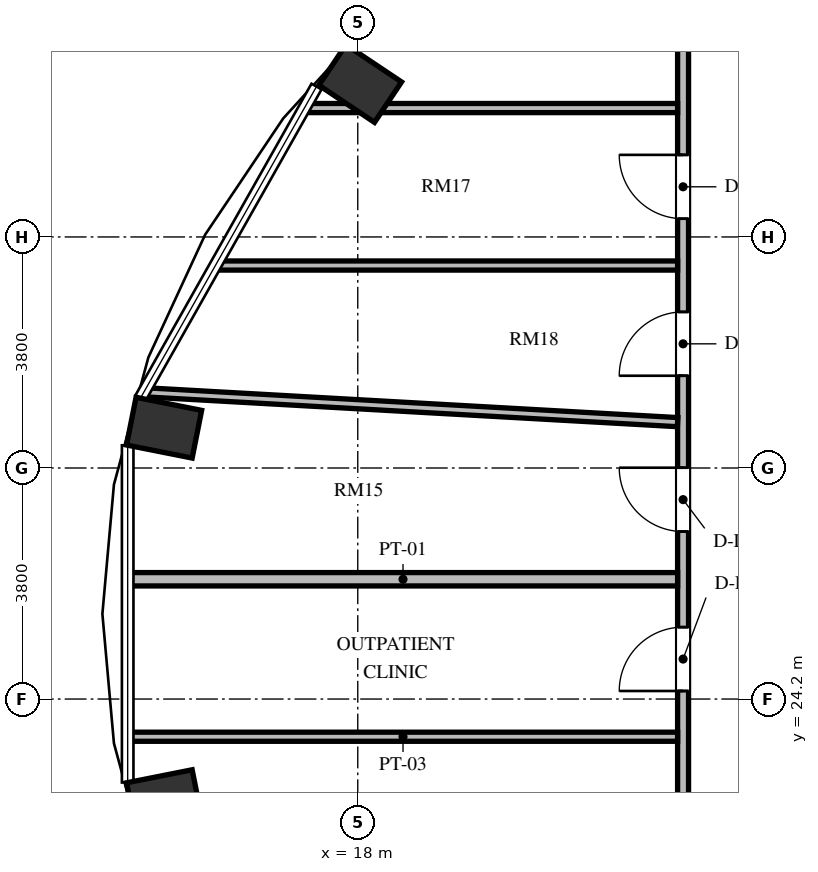
"""IFC4 building model, lengths in metres.
Left out: names, types, materials, properties, quantities, classifications, styles, units other than length and angle.
Written with IfcOpenShell. Run it as: python <this file> out.ifc"""

import sys

from ifc_helpers import new_model, si_unit, direction, frame, frame_2d, origin, origin_2d, place, context, subcontext, project, spatial, rectangle, extrude, element, fill, save


model = new_model("IFC4")
c1 = context("Model", 3, precision=1e-05, world=origin(), true_north=direction((0.0, 1.0)))
c2 = subcontext(c1, "Body", "Model", "MODEL_VIEW")
j1 = project(units=[si_unit("LENGTHUNIT", "METRE"), si_unit("PLANEANGLEUNIT", "RADIAN")], contexts=[c1])
p1 = place(None, origin())
s1 = spatial("IfcSite", under=j1, at=p1, CompositionType="ELEMENT")
p2 = place(p1, origin())
s2 = spatial("IfcBuilding", under=s1, at=p2, CompositionType="ELEMENT")
p3 = place(p2, frame((0.0, 0.0, 209.424)))
s3 = spatial("IfcBuildingStorey", under=s2, at=p3, CompositionType="ELEMENT", Elevation=209.424)
for number, where, z_axis, x_axis in (
    (1, (18.04, 34.323, 0.0), (0.0, 0.0, 1.0), (-0.831, 0.556, 0.0)),
    (2, (14.815, 28.663, 0.0), (0.0, 0.0, 1.0), (-0.981, 0.195, 0.0)),
    (3, (14.815, 22.537, 0.0), (0.0, 0.0, 1.0), (-0.981, -0.195, 0.0)),
):
    element("IfcColumn", number, at=place(p3, frame(where, z_axis=z_axis, x_axis=x_axis)), inside=s3, PredefinedType="COLUMN", context=c2, shape_type="SweptSolid", body=[
        extrude(rectangle(XDim=1.1, YDim=0.8, at=origin_2d()), origin(), (0.0, 0.0, 1.0), 3.648),
    ])
p4 = place(p3, frame((23.35, 19.98, 0.0), z_axis=(0.0, 0.0, 1.0), x_axis=(0.0, 1.0, 0.0)))
e4 = element("IfcWall", 4, at=p4, inside=s3, PredefinedType="PARTITIONING", context=c2, shape_type="SweptSolid", body=[
    extrude(rectangle(XDim=16.042, YDim=0.18, at=frame_2d((8.021, 0.0))), origin(), (0.0, 0.0, 1.0), 3.448),
])
p5 = place(p4, frame((6.975, 0.0, 0.0)))
e5 = element("IfcOpeningElement", 5, at=p5, cuts=e4, PredefinedType="OPENING", context=c2, shape_type="SweptSolid", body=[
    extrude(rectangle(XDim=1.05, YDim=2.15, at=frame_2d((0.525, 1.075))), frame((0.0, 0.1, 0.0), z_axis=(0.0, -1.0, 0.0), x_axis=(1.0, 0.0, 0.0)), (0.0, 0.0, 1.0), 0.2),
])
p6 = place(p4, frame((4.353, 0.0, 0.0)))
e6 = element("IfcOpeningElement", 6, at=p6, cuts=e4, PredefinedType="OPENING", context=c2, shape_type="SweptSolid", body=[
    extrude(rectangle(XDim=1.05, YDim=2.15, at=frame_2d((0.525, 1.075))), frame((0.0, 0.1, 0.0), z_axis=(0.0, -1.0, 0.0), x_axis=(1.0, 0.0, 0.0)), (0.0, 0.0, 1.0), 0.2),
])
p7 = place(p4, frame((12.12, 0.0, 0.0)))
e7 = element("IfcOpeningElement", 7, at=p7, cuts=e4, PredefinedType="OPENING", context=c2, shape_type="SweptSolid", body=[
    extrude(rectangle(XDim=1.05, YDim=2.15, at=frame_2d((0.525, 1.075))), frame((0.0, 0.1, 0.0), z_axis=(0.0, -1.0, 0.0), x_axis=(1.0, 0.0, 0.0)), (0.0, 0.0, 1.0), 0.2),
])
p8 = place(p4, frame((9.537, 0.0, 0.0)))
e8 = element("IfcOpeningElement", 8, at=p8, cuts=e4, PredefinedType="OPENING", context=c2, shape_type="SweptSolid", body=[
    extrude(rectangle(XDim=1.05, YDim=2.15, at=frame_2d((0.525, 1.075))), frame((0.0, 0.1, 0.0), z_axis=(0.0, -1.0, 0.0), x_axis=(1.0, 0.0, 0.0)), (0.0, 0.0, 1.0), 0.2),
])
p9 = place(p3, frame((14.228, 23.58, 0.0), z_axis=(0.0, 0.0, 1.0), x_axis=(1.0, 0.0, 0.0)))
e9 = element("IfcWall", 9, at=p9, inside=s3, PredefinedType="PARTITIONING", context=c2, shape_type="SweptSolid", body=[
    extrude(rectangle(XDim=9.032, YDim=0.15, at=frame_2d((4.516, 0.0))), origin(), (0.0, 0.0, 1.0), 3.448),
])
p10 = place(p3, frame((14.228, 26.17, 0.0), z_axis=(0.0, 0.0, 1.0), x_axis=(1.0, 0.0, 0.0)))
e10 = element("IfcWall", 10, at=p10, inside=s3, PredefinedType="PARTITIONING", context=c2, shape_type="SweptSolid", body=[
    extrude(rectangle(XDim=9.032, YDim=0.22, at=frame_2d((4.516, 0.0))), origin(), (0.0, 0.0, 1.0), 3.448),
])
p11 = place(p3, frame((14.477, 29.247, 0.0), z_axis=(0.0, 0.0, 1.0), x_axis=(0.998432044673, -0.05597724689, 0.0)))
e11 = element("IfcWall", 11, at=p11, inside=s3, PredefinedType="PARTITIONING", context=c2, shape_type="SweptSolid", body=[
    extrude(rectangle(XDim=8.797, YDim=0.15, at=frame_2d((4.398, 0.0))), origin(), (0.0, 0.0, 1.0), 3.448),
])
p12 = place(p3, frame((15.669, 31.33, 0.0), z_axis=(0.0, 0.0, 1.0), x_axis=(1.0, 0.0, 0.0)))
e12 = element("IfcWall", 12, at=p12, inside=s3, PredefinedType="PARTITIONING", context=c2, shape_type="SweptSolid", body=[
    extrude(rectangle(XDim=7.591, YDim=0.15, at=frame_2d((3.796, 0.0))), origin(), (0.0, 0.0, 1.0), 3.448),
])
p13 = place(p3, frame((17.132, 33.92, 0.0), z_axis=(0.0, 0.0, 1.0), x_axis=(1.0, 0.0, 0.0)))
e13 = element("IfcWall", 13, at=p13, inside=s3, PredefinedType="PARTITIONING", context=c2, shape_type="SweptSolid", body=[
    extrude(rectangle(XDim=6.128, YDim=0.15, at=frame_2d((3.064, 0.0))), origin(), (0.0, 0.0, 1.0), 3.448),
])
p14 = place(p5, origin())
e14 = element("IfcDoor", 14, at=p14, inside=s3, OperationType="SINGLE_SWING_RIGHT", PredefinedType="DOOR", context=c2, shape_type="SweptSolid", body=[
    extrude(rectangle(XDim=1.05, YDim=2.15, at=frame_2d((0.525, 1.075))), frame((0.0, 0.025, 0.0), z_axis=(0.0, -1.0, 0.0), x_axis=(1.0, 0.0, 0.0)), (0.0, 0.0, 1.0), 0.05),
])
fill(e5, e14)
p15 = place(p6, origin())
e15 = element("IfcDoor", 15, at=p15, inside=s3, OperationType="SINGLE_SWING_LEFT", PredefinedType="DOOR", context=c2, shape_type="SweptSolid", body=[
    extrude(rectangle(XDim=1.05, YDim=2.15, at=frame_2d((0.525, 1.075))), frame((0.0, 0.025, 0.0), z_axis=(0.0, -1.0, 0.0), x_axis=(1.0, 0.0, 0.0)), (0.0, 0.0, 1.0), 0.05),
])
fill(e6, e15)
p16 = place(p7, origin())
e16 = element("IfcDoor", 16, at=p16, inside=s3, OperationType="SINGLE_SWING_RIGHT", PredefinedType="DOOR", context=c2, shape_type="SweptSolid", body=[
    extrude(rectangle(XDim=1.05, YDim=2.15, at=frame_2d((0.525, 1.075))), frame((0.0, 0.025, 0.0), z_axis=(0.0, -1.0, 0.0), x_axis=(1.0, 0.0, 0.0)), (0.0, 0.0, 1.0), 0.05),
])
fill(e7, e16)
p17 = place(p8, origin())
e17 = element("IfcDoor", 17, at=p17, inside=s3, OperationType="SINGLE_SWING_LEFT", PredefinedType="DOOR", context=c2, shape_type="SweptSolid", body=[
    extrude(rectangle(XDim=1.05, YDim=2.15, at=frame_2d((0.525, 1.075))), frame((0.0, 0.025, 0.0), z_axis=(0.0, -1.0, 0.0), x_axis=(1.0, 0.0, 0.0)), (0.0, 0.0, 1.0), 0.05),
])
fill(e8, e17)
save(model, sys.argv[1])
